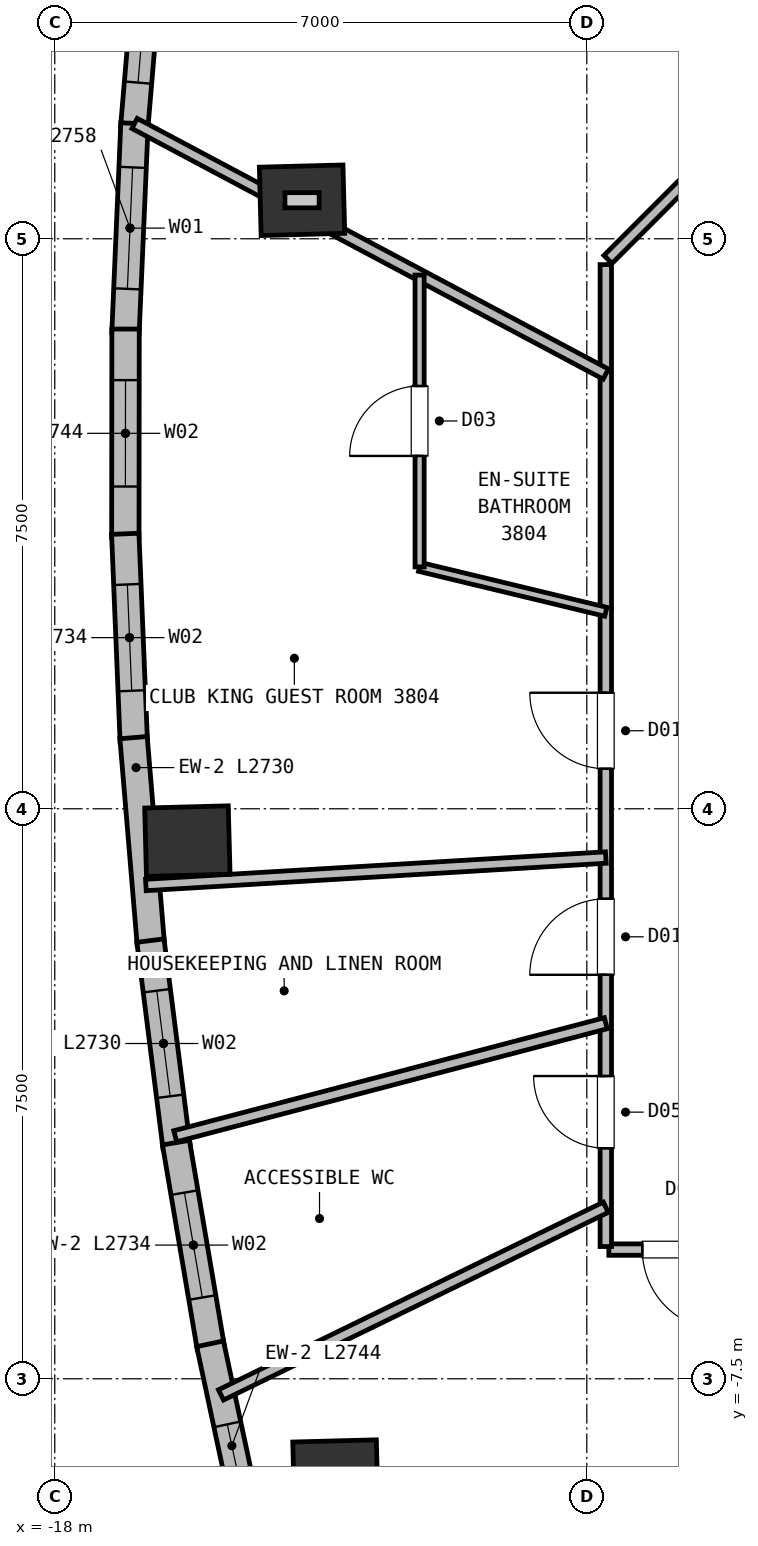
"""IFC4 building model, lengths in metres.
Left out: names, types, materials, properties, quantities, classifications, styles, units other than length and angle.
Written with IfcOpenShell. Run it as: python <this file> out.ifc"""

import sys

from ifc_helpers import new_model, si_unit, direction, frame, frame_2d, origin, origin_2d, place, context, subcontext, project, spatial, rectangle, extrude, element, fill, save


model = new_model("IFC4")
c1 = context("Model", 3, precision=1e-05, world=origin(), true_north=direction((0.0, 1.0)))
c2 = subcontext(c1, "Body", "Model", "MODEL_VIEW")
j1 = project(units=[si_unit("LENGTHUNIT", "METRE"), si_unit("PLANEANGLEUNIT", "RADIAN")], contexts=[c1])
p1 = place(None, origin())
s1 = spatial("IfcSite", under=j1, at=p1, CompositionType="ELEMENT")
p2 = place(p1, origin())
s2 = spatial("IfcBuilding", under=s1, at=p2, CompositionType="ELEMENT")
p3 = place(p2, frame((0.0, 0.0, 142.25)))
s3 = spatial("IfcBuildingStorey", under=s2, at=p3, CompositionType="ELEMENT", Elevation=142.25)
for number, where, z_axis, x_axis in (
    (1, (-14.747, 8.007, 0.0), (0.0, 0.0, 1.0), (-0.026, 1.0, 0.0)),
    (2, (-16.255, -0.426, 0.0), (0.0, 0.0, 1.0), (-0.026, 1.0, 0.0)),
    (3, (-14.307, -8.768, 0.0), (0.0, 0.0, 1.0), (-0.026, 1.0, 0.0)),
):
    element("IfcColumn", number, at=place(p3, frame(where, z_axis=z_axis, x_axis=x_axis)), inside=s3, PredefinedType="COLUMN", context=c2, shape_type="SweptSolid", body=[
        extrude(rectangle(XDim=0.9, YDim=1.1, at=origin_2d()), origin(), (0.0, 0.0, 1.0), 3.75),
    ])
p4 = place(p3, frame((-16.954, 8.968, 0.0), z_axis=(0.0, 0.0, 1.0), x_axis=(0.084209356436, 0.996448084091, 0.0)))
e4 = element("IfcWall", 4, at=p4, inside=s3, PredefinedType="SOLIDWALL", context=c2, shape_type="SweptSolid", body=[
    extrude(rectangle(XDim=2.777, YDim=0.36, at=frame_2d((1.389, 0.0))), origin(), (0.0, 0.0, 1.0), 3.5),
])
p5 = place(p4, frame((0.589, 0.0, 0.72)))
e5 = element("IfcOpeningElement", 5, at=p5, cuts=e4, PredefinedType="OPENING", context=c2, shape_type="SweptSolid", body=[
    extrude(rectangle(XDim=1.6, YDim=1.88, at=frame_2d((0.8, 0.94))), frame((0.0, 0.19, 0.0), z_axis=(0.0, -1.0, 0.0), x_axis=(1.0, 0.0, 0.0)), (0.0, 0.0, 1.0), 0.38),
])
p6 = place(p3, frame((-17.07, 6.262, 0.0), z_axis=(0.0, 0.0, 1.0), x_axis=(0.043014721574, 0.999074438532, 0.0)))
e6 = element("IfcWall", 6, at=p6, inside=s3, PredefinedType="SOLIDWALL", context=c2, shape_type="SweptSolid", body=[
    extrude(rectangle(XDim=2.758, YDim=0.36, at=frame_2d((1.379, 0.0))), origin(), (0.0, 0.0, 1.0), 3.5),
])
p7 = place(p6, frame((0.579, 0.0, 0.72)))
e7 = element("IfcOpeningElement", 7, at=p7, cuts=e6, PredefinedType="OPENING", context=c2, shape_type="SweptSolid", body=[
    extrude(rectangle(XDim=1.6, YDim=1.88, at=frame_2d((0.8, 0.94))), frame((0.0, 0.19, 0.0), z_axis=(0.0, -1.0, 0.0), x_axis=(1.0, 0.0, 0.0)), (0.0, 0.0, 1.0), 0.38),
])
p8 = place(p3, frame((-17.072, 3.568, 0.0), z_axis=(0.0, 0.0, 1.0), x_axis=(0.001156582856, 0.999999331158, 0.0)))
e8 = element("IfcWall", 8, at=p8, inside=s3, PredefinedType="SOLIDWALL", context=c2, shape_type="SweptSolid", body=[
    extrude(rectangle(XDim=2.744, YDim=0.36, at=frame_2d((1.372, 0.0))), origin(), (0.0, 0.0, 1.0), 3.5),
])
p9 = place(p8, frame((0.672, 0.0, 0.72)))
e9 = element("IfcOpeningElement", 9, at=p9, cuts=e8, PredefinedType="OPENING", context=c2, shape_type="SweptSolid", body=[
    extrude(rectangle(XDim=1.4, YDim=1.84, at=frame_2d((0.7, 0.92))), frame((0.0, 0.19, 0.0), z_axis=(0.0, -1.0, 0.0), x_axis=(1.0, 0.0, 0.0)), (0.0, 0.0, 1.0), 0.38),
])
p10 = place(p3, frame((-16.96, 0.886, 0.0), z_axis=(0.0, 0.0, 1.0), x_axis=(-0.040980646294, 0.999159940465, 0.0)))
e10 = element("IfcWall", 10, at=p10, inside=s3, PredefinedType="SOLIDWALL", context=c2, shape_type="SweptSolid", body=[
    extrude(rectangle(XDim=2.734, YDim=0.36, at=frame_2d((1.367, 0.0))), origin(), (0.0, 0.0, 1.0), 3.5),
])
p11 = place(p10, frame((0.667, 0.0, 0.72)))
e11 = element("IfcOpeningElement", 11, at=p11, cuts=e10, PredefinedType="OPENING", context=c2, shape_type="SweptSolid", body=[
    extrude(rectangle(XDim=1.4, YDim=1.84, at=frame_2d((0.7, 0.92))), frame((0.0, 0.19, 0.0), z_axis=(0.0, -1.0, 0.0), x_axis=(1.0, 0.0, 0.0)), (0.0, 0.0, 1.0), 0.38),
])
p12 = place(p3, frame((-16.736, -1.784, 0.0), z_axis=(0.0, 0.0, 1.0), x_axis=(-0.083363780418, 0.99651918201, 0.0)))
e12 = element("IfcWall", 12, at=p12, inside=s3, PredefinedType="SOLIDWALL", context=c2, shape_type="SweptSolid", body=[
    extrude(rectangle(XDim=2.729, YDim=0.36, at=frame_2d((1.365, 0.0))), origin(), (0.0, 0.0, 1.0), 3.5),
])
p13 = place(p3, frame((-16.398, -4.442, 0.0), z_axis=(0.0, 0.0, 1.0), x_axis=(-0.125663758649, 0.992072890347, 0.0)))
e13 = element("IfcWall", 13, at=p13, inside=s3, PredefinedType="SOLIDWALL", context=c2, shape_type="SweptSolid", body=[
    extrude(rectangle(XDim=2.73, YDim=0.36, at=frame_2d((1.365, 0.0))), origin(), (0.0, 0.0, 1.0), 3.5),
])
p14 = place(p13, frame((0.665, 0.0, 0.72)))
e14 = element("IfcOpeningElement", 14, at=p14, cuts=e13, PredefinedType="OPENING", context=c2, shape_type="SweptSolid", body=[
    extrude(rectangle(XDim=1.4, YDim=1.84, at=frame_2d((0.7, 0.92))), frame((0.0, 0.19, 0.0), z_axis=(0.0, -1.0, 0.0), x_axis=(1.0, 0.0, 0.0)), (0.0, 0.0, 1.0), 0.38),
])
p15 = place(p3, frame((-15.947, -7.089, 0.0), z_axis=(0.0, 0.0, 1.0), x_axis=(-0.167598097405, 0.985855404076, 0.0)))
e15 = element("IfcWall", 15, at=p15, inside=s3, PredefinedType="SOLIDWALL", context=c2, shape_type="SweptSolid", body=[
    extrude(rectangle(XDim=2.734, YDim=0.36, at=frame_2d((1.367, 0.0))), origin(), (0.0, 0.0, 1.0), 3.5),
])
p16 = place(p15, frame((0.667, 0.0, 0.72)))
e16 = element("IfcOpeningElement", 16, at=p16, cuts=e15, PredefinedType="OPENING", context=c2, shape_type="SweptSolid", body=[
    extrude(rectangle(XDim=1.4, YDim=1.84, at=frame_2d((0.7, 0.92))), frame((0.0, 0.19, 0.0), z_axis=(0.0, -1.0, 0.0), x_axis=(1.0, 0.0, 0.0)), (0.0, 0.0, 1.0), 0.38),
])
p17 = place(p3, frame((-15.383, -9.723, 0.0), z_axis=(0.0, 0.0, 1.0), x_axis=(-0.209000421091, 0.977915550538, 0.0)))
e17 = element("IfcWall", 17, at=p17, inside=s3, PredefinedType="SOLIDWALL", context=c2, shape_type="SweptSolid", body=[
    extrude(rectangle(XDim=2.744, YDim=0.36, at=frame_2d((1.372, 0.0))), origin(), (0.0, 0.0, 1.0), 3.5),
])
p18 = place(p17, frame((0.26, 0.0, 0.72)))
e18 = element("IfcOpeningElement", 18, at=p18, cuts=e17, PredefinedType="OPENING", context=c2, shape_type="SweptSolid", body=[
    extrude(rectangle(XDim=1.4, YDim=1.84, at=frame_2d((0.7, 0.92))), frame((0.0, 0.19, 0.0), z_axis=(0.0, -1.0, 0.0), x_axis=(1.0, 0.0, 0.0)), (0.0, 0.0, 1.0), 0.38),
])
p19 = place(p3, frame((-8.69, -5.8, 0.0), z_axis=(0.0, 0.0, 1.0), x_axis=(-1.0, 0.0, 0.0)))
e19 = element("IfcWall", 19, at=p19, inside=s3, PredefinedType="PARTITIONING", context=c2, shape_type="SweptSolid", body=[
    extrude(rectangle(XDim=2.02, YDim=0.15, at=frame_2d((1.01, 0.0))), origin(), (0.0, 0.0, 1.0), 3.5),
])
p20 = place(p19, frame((0.52, 0.0, 0.0)))
e20 = element("IfcOpeningElement", 20, at=p20, cuts=e19, PredefinedType="OPENING", context=c2, shape_type="SweptSolid", body=[
    extrude(rectangle(XDim=1.06, YDim=2.15, at=frame_2d((0.53, 1.075))), frame((0.0, 0.085, 0.0), z_axis=(0.0, -1.0, 0.0), x_axis=(1.0, 0.0, 0.0)), (0.0, 0.0, 1.0), 0.17),
])
p21 = place(p3, frame((-10.722, 7.228, 0.0), z_axis=(0.0, 0.0, 1.0), x_axis=(0.707106781187, 0.707106781187, 0.0)))
e21 = element("IfcWall", 21, at=p21, inside=s3, PredefinedType="PARTITIONING", context=c2, shape_type="SweptSolid", body=[
    extrude(rectangle(XDim=2.89, YDim=0.15, at=frame_2d((1.445, 0.0))), origin(), (0.0, 0.0, 1.0), 3.5),
])
p22 = place(p3, frame((-10.75, -5.76, 0.0), z_axis=(0.0, 0.0, 1.0), x_axis=(0.0, 1.0, 0.0)))
e22 = element("IfcWall", 22, at=p22, inside=s3, PredefinedType="PARTITIONING", context=c2, shape_type="SweptSolid", body=[
    extrude(rectangle(XDim=12.92, YDim=0.15, at=frame_2d((6.46, 0.0))), origin(), (0.0, 0.0, 1.0), 3.5),
])
p23 = place(p22, frame((1.293, 0.0, 0.0)))
e23 = element("IfcOpeningElement", 23, at=p23, cuts=e22, PredefinedType="OPENING", context=c2, shape_type="SweptSolid", body=[
    extrude(rectangle(XDim=0.95, YDim=2.1, at=frame_2d((0.475, 1.05))), frame((0.0, 0.085, 0.0), z_axis=(0.0, -1.0, 0.0), x_axis=(1.0, 0.0, 0.0)), (0.0, 0.0, 1.0), 0.17),
])
p24 = place(p22, frame((3.575, 0.0, 0.0)))
e24 = element("IfcOpeningElement", 24, at=p24, cuts=e22, PredefinedType="OPENING", context=c2, shape_type="SweptSolid", body=[
    extrude(rectangle(XDim=1.0, YDim=2.15, at=frame_2d((0.5, 1.075))), frame((0.0, 0.085, 0.0), z_axis=(0.0, -1.0, 0.0), x_axis=(1.0, 0.0, 0.0)), (0.0, 0.0, 1.0), 0.17),
])
p25 = place(p22, frame((6.287, 0.0, 0.0)))
e25 = element("IfcOpeningElement", 25, at=p25, cuts=e22, PredefinedType="OPENING", context=c2, shape_type="SweptSolid", body=[
    extrude(rectangle(XDim=1.0, YDim=2.15, at=frame_2d((0.5, 1.075))), frame((0.0, 0.085, 0.0), z_axis=(0.0, -1.0, 0.0), x_axis=(1.0, 0.0, 0.0)), (0.0, 0.0, 1.0), 0.17),
])
p26 = place(p3, frame((-10.75, -5.243, 0.0), z_axis=(0.0, 0.0, 1.0), x_axis=(-0.898795936553, -0.438367271172, 0.0)))
e26 = element("IfcWall", 26, at=p26, inside=s3, PredefinedType="PARTITIONING", context=c2, shape_type="SweptSolid", body=[
    extrude(rectangle(XDim=5.633, YDim=0.15, at=frame_2d((2.816, 0.0))), origin(), (0.0, 0.0, 1.0), 3.5),
])
p27 = place(p3, frame((-5.771, 9.3, 0.0), z_axis=(0.0, 0.0, 1.0), x_axis=(-0.527300490904, 0.849678875983, 0.0)))
e27 = element("IfcWall", 27, at=p27, inside=s3, PredefinedType="PARTITIONING", context=c2, shape_type="SweptSolid", body=[
    extrude(rectangle(XDim=12.862, YDim=0.15, at=frame_2d((6.431, 0.0))), origin(), (0.0, 0.0, 1.0), 3.5),
])
p28 = place(p3, frame((-10.75, 5.719, 0.0), z_axis=(0.0, 0.0, 1.0), x_axis=(-0.882843253565, 0.469667743873, 0.0)))
e28 = element("IfcWall", 28, at=p28, inside=s3, PredefinedType="PARTITIONING", context=c2, shape_type="SweptSolid", body=[
    extrude(rectangle(XDim=7.023, YDim=0.15, at=frame_2d((3.511, 0.0))), origin(), (0.0, 0.0, 1.0), 3.5),
])
p29 = place(p3, frame((-10.75, 2.592, 0.0), z_axis=(0.0, 0.0, 1.0), x_axis=(-0.972131712449, 0.234435350685, 0.0)))
e29 = element("IfcWall", 29, at=p29, inside=s3, PredefinedType="PARTITIONING", context=c2, shape_type="SweptSolid", body=[
    extrude(rectangle(XDim=2.52, YDim=0.12, at=frame_2d((1.26, 0.0))), origin(), (0.0, 0.0, 1.0), 3.5),
])
p30 = place(p3, frame((-13.2, 3.183, 0.0), z_axis=(0.0, 0.0, 1.0), x_axis=(0.0, 1.0, 0.0)))
e30 = element("IfcWall", 30, at=p30, inside=s3, PredefinedType="PARTITIONING", context=c2, shape_type="SweptSolid", body=[
    extrude(rectangle(XDim=3.84, YDim=0.12, at=frame_2d((1.92, 0.0))), origin(), (0.0, 0.0, 1.0), 3.5),
])
p31 = place(p30, frame((1.46, 0.0, 0.0)))
e31 = element("IfcOpeningElement", 31, at=p31, cuts=e30, PredefinedType="OPENING", context=c2, shape_type="SweptSolid", body=[
    extrude(rectangle(XDim=0.92, YDim=2.1, at=frame_2d((0.46, 1.05))), frame((0.0, 0.07, 0.0), z_axis=(0.0, -1.0, 0.0), x_axis=(1.0, 0.0, 0.0)), (0.0, 0.0, 1.0), 0.14),
])
p32 = place(p3, frame((-10.75, -0.642, 0.0), z_axis=(0.0, 0.0, 1.0), x_axis=(-0.9982220436, -0.059604963468, 0.0)))
e32 = element("IfcWall", 32, at=p32, inside=s3, PredefinedType="PARTITIONING", context=c2, shape_type="SweptSolid", body=[
    extrude(rectangle(XDim=6.062, YDim=0.15, at=frame_2d((3.031, 0.0))), origin(), (0.0, 0.0, 1.0), 3.5),
])
p33 = place(p3, frame((-10.75, -2.822, 0.0), z_axis=(0.0, 0.0, 1.0), x_axis=(-0.967231477209, -0.253896178576, 0.0)))
e33 = element("IfcWall", 33, at=p33, inside=s3, PredefinedType="PARTITIONING", context=c2, shape_type="SweptSolid", body=[
    extrude(rectangle(XDim=5.857, YDim=0.15, at=frame_2d((2.928, 0.0))), origin(), (0.0, 0.0, 1.0), 3.5),
])
p34 = place(p5, origin())
e34 = element("IfcWindow", 34, at=p34, inside=s3, PartitioningType="SINGLE_PANEL", PredefinedType="WINDOW", context=c2, shape_type="SweptSolid", body=[
    extrude(rectangle(XDim=1.6, YDim=1.88, at=frame_2d((0.8, 0.94))), frame((0.0, 0.03, 0.0), z_axis=(0.0, -1.0, 0.0), x_axis=(1.0, 0.0, 0.0)), (0.0, 0.0, 1.0), 0.06),
])
fill(e5, e34)
p35 = place(p7, origin())
e35 = element("IfcWindow", 35, at=p35, inside=s3, PartitioningType="SINGLE_PANEL", PredefinedType="WINDOW", context=c2, shape_type="SweptSolid", body=[
    extrude(rectangle(XDim=1.6, YDim=1.88, at=frame_2d((0.8, 0.94))), frame((0.0, 0.03, 0.0), z_axis=(0.0, -1.0, 0.0), x_axis=(1.0, 0.0, 0.0)), (0.0, 0.0, 1.0), 0.06),
])
fill(e7, e35)
p36 = place(p9, origin())
e36 = element("IfcWindow", 36, at=p36, inside=s3, PartitioningType="SINGLE_PANEL", PredefinedType="WINDOW", context=c2, shape_type="SweptSolid", body=[
    extrude(rectangle(XDim=1.4, YDim=1.84, at=frame_2d((0.7, 0.92))), frame((0.0, 0.03, 0.0), z_axis=(0.0, -1.0, 0.0), x_axis=(1.0, 0.0, 0.0)), (0.0, 0.0, 1.0), 0.06),
])
fill(e9, e36)
p37 = place(p11, origin())
e37 = element("IfcWindow", 37, at=p37, inside=s3, PartitioningType="SINGLE_PANEL", PredefinedType="WINDOW", context=c2, shape_type="SweptSolid", body=[
    extrude(rectangle(XDim=1.4, YDim=1.84, at=frame_2d((0.7, 0.92))), frame((0.0, 0.03, 0.0), z_axis=(0.0, -1.0, 0.0), x_axis=(1.0, 0.0, 0.0)), (0.0, 0.0, 1.0), 0.06),
])
fill(e11, e37)
p38 = place(p14, origin())
e38 = element("IfcWindow", 38, at=p38, inside=s3, PartitioningType="SINGLE_PANEL", PredefinedType="WINDOW", context=c2, shape_type="SweptSolid", body=[
    extrude(rectangle(XDim=1.4, YDim=1.84, at=frame_2d((0.7, 0.92))), frame((0.0, 0.03, 0.0), z_axis=(0.0, -1.0, 0.0), x_axis=(1.0, 0.0, 0.0)), (0.0, 0.0, 1.0), 0.06),
])
fill(e14, e38)
p39 = place(p16, origin())
e39 = element("IfcWindow", 39, at=p39, inside=s3, PartitioningType="SINGLE_PANEL", PredefinedType="WINDOW", context=c2, shape_type="SweptSolid", body=[
    extrude(rectangle(XDim=1.4, YDim=1.84, at=frame_2d((0.7, 0.92))), frame((0.0, 0.03, 0.0), z_axis=(0.0, -1.0, 0.0), x_axis=(1.0, 0.0, 0.0)), (0.0, 0.0, 1.0), 0.06),
])
fill(e16, e39)
p40 = place(p18, origin())
e40 = element("IfcWindow", 40, at=p40, inside=s3, PartitioningType="SINGLE_PANEL", PredefinedType="WINDOW", context=c2, shape_type="SweptSolid", body=[
    extrude(rectangle(XDim=1.4, YDim=1.84, at=frame_2d((0.7, 0.92))), frame((0.0, 0.03, 0.0), z_axis=(0.0, -1.0, 0.0), x_axis=(1.0, 0.0, 0.0)), (0.0, 0.0, 1.0), 0.06),
])
fill(e18, e40)
p41 = place(p31, origin())
e41 = element("IfcDoor", 41, at=p41, inside=s3, OperationType="SINGLE_SWING_LEFT", PredefinedType="DOOR", context=c2, shape_type="SweptSolid", body=[
    extrude(rectangle(XDim=0.92, YDim=2.1, at=frame_2d((0.46, 1.05))), frame((0.0, 0.025, 0.0), z_axis=(0.0, -1.0, 0.0), x_axis=(1.0, 0.0, 0.0)), (0.0, 0.0, 1.0), 0.05),
])
fill(e31, e41)
p42 = place(p23, origin())
e42 = element("IfcDoor", 42, at=p42, inside=s3, OperationType="SINGLE_SWING_RIGHT", PredefinedType="DOOR", context=c2, shape_type="SweptSolid", body=[
    extrude(rectangle(XDim=0.95, YDim=2.1, at=frame_2d((0.475, 1.05))), frame((0.0, 0.025, 0.0), z_axis=(0.0, -1.0, 0.0), x_axis=(1.0, 0.0, 0.0)), (0.0, 0.0, 1.0), 0.05),
])
fill(e23, e42)
p43 = place(p24, origin())
e43 = element("IfcDoor", 43, at=p43, inside=s3, OperationType="SINGLE_SWING_LEFT", PredefinedType="DOOR", context=c2, shape_type="SweptSolid", body=[
    extrude(rectangle(XDim=1.0, YDim=2.15, at=frame_2d((0.5, 1.075))), frame((0.0, 0.025, 0.0), z_axis=(0.0, -1.0, 0.0), x_axis=(1.0, 0.0, 0.0)), (0.0, 0.0, 1.0), 0.05),
])
fill(e24, e43)
p44 = place(p25, origin())
e44 = element("IfcDoor", 44, at=p44, inside=s3, OperationType="SINGLE_SWING_RIGHT", PredefinedType="DOOR", context=c2, shape_type="SweptSolid", body=[
    extrude(rectangle(XDim=1.0, YDim=2.15, at=frame_2d((0.5, 1.075))), frame((0.0, 0.025, 0.0), z_axis=(0.0, -1.0, 0.0), x_axis=(1.0, 0.0, 0.0)), (0.0, 0.0, 1.0), 0.05),
])
fill(e25, e44)
p45 = place(p20, origin())
e45 = element("IfcDoor", 45, at=p45, inside=s3, OperationType="SINGLE_SWING_LEFT", PredefinedType="DOOR", context=c2, shape_type="SweptSolid", body=[
    extrude(rectangle(XDim=1.06, YDim=2.15, at=frame_2d((0.53, 1.075))), frame((0.0, 0.025, 0.0), z_axis=(0.0, -1.0, 0.0), x_axis=(1.0, 0.0, 0.0)), (0.0, 0.0, 1.0), 0.05),
])
fill(e20, e45)
save(model, sys.argv[1])
